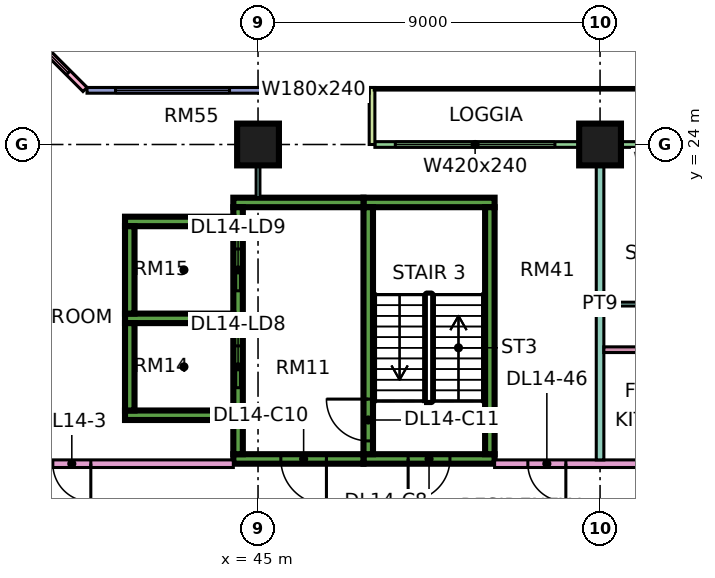
"""IFC4 building model, lengths in metres.
Left out: names, types, materials, properties, quantities, classifications, styles, units other than length and angle.
Written with IfcOpenShell. Run it as: python <this file> out.ifc"""

import sys

from ifc_helpers import new_model, si_unit, direction, frame, frame_2d, origin, origin_2d, place, context, subcontext, project, spatial, rectangle, extrude, element, fill, save


model = new_model("IFC4")
c1 = context("Model", 3, precision=1e-05, world=origin(), true_north=direction((0.0, 1.0)))
c2 = subcontext(c1, "Body", "Model", "MODEL_VIEW")
j1 = project(units=[si_unit("LENGTHUNIT", "METRE"), si_unit("PLANEANGLEUNIT", "RADIAN")], contexts=[c1])
p1 = place(None, origin())
s1 = spatial("IfcSite", under=j1, at=p1, CompositionType="ELEMENT")
p2 = place(p1, origin())
s2 = spatial("IfcBuilding", under=s1, at=p2, CompositionType="ELEMENT")
p3 = place(p2, frame((0.0, 0.0, 67.65)))
s3 = spatial("IfcBuildingStorey", under=s2, at=p3, CompositionType="ELEMENT", Elevation=67.65)
for number, where, z_axis, x_axis in (
    (1, (45.0, 24.0, 0.0), (0.0, 0.0, 1.0), (1.0, 0.0, 0.0)),
    (2, (54.0, 24.0, 0.0), (0.0, 0.0, 1.0), (1.0, 0.0, 0.0)),
):
    element("IfcColumn", number, at=place(p3, frame(where, z_axis=z_axis, x_axis=x_axis)), inside=s3, PredefinedType="COLUMN", context=c2, shape_type="SweptSolid", body=[
        extrude(rectangle(XDim=1.1, YDim=1.1, at=origin_2d()), origin(), (0.0, 0.0, 1.0), 3.75),
    ])
p4 = place(p3, frame((47.775, 15.725, 0.0), z_axis=(0.0, 0.0, 1.0), x_axis=(1.0, 0.0, 0.0)))
e3 = element("IfcWall", 3, at=p4, inside=s3, PredefinedType="SHEAR", context=c2, shape_type="SweptSolid", body=[
    extrude(rectangle(XDim=3.45, YDim=0.25, at=frame_2d((1.725, 0.0))), origin(), (0.0, 0.0, 1.0), 3.75),
])
p5 = place(p4, frame((1.175, 0.0, 0.0)))
e4 = element("IfcOpeningElement", 4, at=p5, cuts=e3, PredefinedType="OPENING", context=c2, shape_type="SweptSolid", body=[
    extrude(rectangle(XDim=1.1, YDim=2.2, at=frame_2d((0.55, 1.1))), frame((0.0, 0.135, 0.0), z_axis=(0.0, -1.0, 0.0), x_axis=(1.0, 0.0, 0.0)), (0.0, 0.0, 1.0), 0.27),
])
p6 = place(p3, frame((47.775, 22.475, 0.0), z_axis=(0.0, 0.0, 1.0), x_axis=(1.0, 0.0, 0.0)))
e5 = element("IfcWall", 5, at=p6, inside=s3, PredefinedType="SHEAR", context=c2, shape_type="SweptSolid", body=[
    extrude(rectangle(XDim=3.45, YDim=0.25, at=frame_2d((1.725, 0.0))), origin(), (0.0, 0.0, 1.0), 3.75),
])
p7 = place(p3, frame((47.9, 15.85, 0.0), z_axis=(0.0, 0.0, 1.0), x_axis=(0.0, 1.0, 0.0)))
e6 = element("IfcWall", 6, at=p7, inside=s3, PredefinedType="SHEAR", context=c2, shape_type="SweptSolid", body=[
    extrude(rectangle(XDim=6.5, YDim=0.25, at=frame_2d((3.25, 0.0))), origin(), (0.0, 0.0, 1.0), 3.75),
])
p8 = place(p7, frame((0.35, 0.0, 0.0)))
e7 = element("IfcOpeningElement", 7, at=p8, cuts=e6, PredefinedType="OPENING", context=c2, shape_type="SweptSolid", body=[
    extrude(rectangle(XDim=1.1, YDim=2.2, at=frame_2d((0.55, 1.1))), frame((0.0, 0.135, 0.0), z_axis=(0.0, -1.0, 0.0), x_axis=(1.0, 0.0, 0.0)), (0.0, 0.0, 1.0), 0.27),
])
p9 = place(p3, frame((51.1, 15.85, 0.0), z_axis=(0.0, 0.0, 1.0), x_axis=(0.0, 1.0, 0.0)))
e8 = element("IfcWall", 8, at=p9, inside=s3, PredefinedType="SHEAR", context=c2, shape_type="SweptSolid", body=[
    extrude(rectangle(XDim=6.5, YDim=0.25, at=frame_2d((3.25, 0.0))), origin(), (0.0, 0.0, 1.0), 3.75),
])
p10 = place(p3, frame((44.35, 15.725, 0.0), z_axis=(0.0, 0.0, 1.0), x_axis=(1.0, 0.0, 0.0)))
e9 = element("IfcWall", 9, at=p10, inside=s3, PredefinedType="SHEAR", context=c2, shape_type="SweptSolid", body=[
    extrude(rectangle(XDim=3.425, YDim=0.25, at=frame_2d((1.712, 0.0))), origin(), (0.0, 0.0, 1.0), 3.75),
])
p11 = place(p10, frame((1.25, 0.0, 0.0)))
e10 = element("IfcOpeningElement", 10, at=p11, cuts=e9, PredefinedType="OPENING", context=c2, shape_type="SweptSolid", body=[
    extrude(rectangle(XDim=1.2, YDim=2.2, at=frame_2d((0.6, 1.1))), frame((0.0, 0.135, 0.0), z_axis=(0.0, -1.0, 0.0), x_axis=(1.0, 0.0, 0.0)), (0.0, 0.0, 1.0), 0.27),
])
p12 = place(p3, frame((44.35, 22.475, 0.0), z_axis=(0.0, 0.0, 1.0), x_axis=(1.0, 0.0, 0.0)))
e11 = element("IfcWall", 11, at=p12, inside=s3, PredefinedType="SHEAR", context=c2, shape_type="SweptSolid", body=[
    extrude(rectangle(XDim=3.425, YDim=0.25, at=frame_2d((1.712, 0.0))), origin(), (0.0, 0.0, 1.0), 3.75),
])
p13 = place(p3, frame((44.475, 15.85, 0.0), z_axis=(0.0, 0.0, 1.0), x_axis=(0.0, 1.0, 0.0)))
e12 = element("IfcWall", 12, at=p13, inside=s3, PredefinedType="SHEAR", context=c2, shape_type="SweptSolid", body=[
    extrude(rectangle(XDim=6.5, YDim=0.25, at=frame_2d((3.25, 0.0))), origin(), (0.0, 0.0, 1.0), 3.75),
])
p14 = place(p13, frame((1.75, 0.0, 0.0)))
e13 = element("IfcOpeningElement", 13, at=p14, cuts=e12, PredefinedType="OPENING", context=c2, shape_type="SweptSolid", body=[
    extrude(rectangle(XDim=1.1, YDim=2.2, at=frame_2d((0.55, 1.1))), frame((0.0, 0.135, 0.0), z_axis=(0.0, -1.0, 0.0), x_axis=(1.0, 0.0, 0.0)), (0.0, 0.0, 1.0), 0.27),
])
p15 = place(p13, frame((4.3, 0.0, 0.0)))
e14 = element("IfcOpeningElement", 14, at=p15, cuts=e12, PredefinedType="OPENING", context=c2, shape_type="SweptSolid", body=[
    extrude(rectangle(XDim=1.1, YDim=2.2, at=frame_2d((0.55, 1.1))), frame((0.0, 0.135, 0.0), z_axis=(0.0, -1.0, 0.0), x_axis=(1.0, 0.0, 0.0)), (0.0, 0.0, 1.0), 0.27),
])
for number, where, z_axis, x_axis in (
    (15, (41.5, 16.875, 0.0), (0.0, 0.0, 1.0), (1.0, 0.0, 0.0)),
    (16, (41.5, 19.425, 0.0), (0.0, 0.0, 1.0), (1.0, 0.0, 0.0)),
    (17, (41.5, 21.975, 0.0), (0.0, 0.0, 1.0), (1.0, 0.0, 0.0)),
):
    element("IfcWall", number, at=place(p3, frame(where, z_axis=z_axis, x_axis=x_axis)), inside=s3, PredefinedType="SHEAR", context=c2, shape_type="SweptSolid", body=[
        extrude(rectangle(XDim=2.85, YDim=0.25, at=frame_2d((1.425, 0.0))), origin(), (0.0, 0.0, 1.0), 3.75),
    ])
for number, where, z_axis, x_axis in (
    (18, (41.625, 17.0, 0.0), (0.0, 0.0, 1.0), (0.0, 1.0, 0.0)),
    (19, (41.625, 19.55, 0.0), (0.0, 0.0, 1.0), (0.0, 1.0, 0.0)),
):
    element("IfcWall", number, at=place(p3, frame(where, z_axis=z_axis, x_axis=x_axis)), inside=s3, PredefinedType="SHEAR", context=c2, shape_type="SweptSolid", body=[
        extrude(rectangle(XDim=2.3, YDim=0.25, at=frame_2d((1.15, 0.0))), origin(), (0.0, 0.0, 1.0), 3.75),
    ])
p16 = place(p3, frame((59.925, 24.0, 0.0), z_axis=(0.0, 0.0, 1.0), x_axis=(-1.0, 0.0, 0.0)))
e20 = element("IfcWall", 20, at=p16, inside=s3, PredefinedType="SOLIDWALL", context=c2, shape_type="SweptSolid", body=[
    extrude(rectangle(XDim=11.85, YDim=0.15, at=frame_2d((5.925, 0.0))), origin(), (0.0, 0.0, 1.0), 3.35),
])
p17 = place(p16, frame((0.562, 0.0, 0.45)))
e21 = element("IfcOpeningElement", 21, at=p17, cuts=e20, PredefinedType="OPENING", context=c2, shape_type="SweptSolid", body=[
    extrude(rectangle(XDim=1.8, YDim=2.4, at=frame_2d((0.9, 1.2))), frame((0.0, 0.085, 0.0), z_axis=(0.0, -1.0, 0.0), x_axis=(1.0, 0.0, 0.0)), (0.0, 0.0, 1.0), 0.17),
])
p18 = place(p16, frame((3.5, 0.0, 0.45)))
e22 = element("IfcOpeningElement", 22, at=p18, cuts=e20, PredefinedType="OPENING", context=c2, shape_type="SweptSolid", body=[
    extrude(rectangle(XDim=1.2, YDim=2.4, at=frame_2d((0.6, 1.2))), frame((0.0, 0.085, 0.0), z_axis=(0.0, -1.0, 0.0), x_axis=(1.0, 0.0, 0.0)), (0.0, 0.0, 1.0), 0.17),
])
p19 = place(p16, frame((7.113, 0.0, 0.45)))
e23 = element("IfcOpeningElement", 23, at=p19, cuts=e20, PredefinedType="OPENING", context=c2, shape_type="SweptSolid", body=[
    extrude(rectangle(XDim=4.2, YDim=2.4, at=frame_2d((2.1, 1.2))), frame((0.0, 0.085, 0.0), z_axis=(0.0, -1.0, 0.0), x_axis=(1.0, 0.0, 0.0)), (0.0, 0.0, 1.0), 0.17),
])
p20 = place(p3, frame((48.0, 25.5, 0.0), z_axis=(0.0, 0.0, 1.0), x_axis=(0.0, -1.0, 0.0)))
e24 = element("IfcWall", 24, at=p20, inside=s3, PredefinedType="SOLIDWALL", context=c2, shape_type="SweptSolid", body=[
    extrude(rectangle(XDim=1.5, YDim=0.15, at=frame_2d((0.75, 0.0))), origin(), (0.0, 0.0, 1.0), 3.35),
])
p21 = place(p3, frame((47.925, 25.425, 0.0), z_axis=(0.0, 0.0, 1.0), x_axis=(-1.0, 0.0, 0.0)))
e25 = element("IfcWall", 25, at=p21, inside=s3, PredefinedType="SOLIDWALL", context=c2, shape_type="SweptSolid", body=[
    extrude(rectangle(XDim=7.425, YDim=0.15, at=frame_2d((3.712, 0.0))), origin(), (0.0, 0.0, 1.0), 3.35),
])
p22 = place(p21, frame((0.562, 0.0, 0.45)))
e26 = element("IfcOpeningElement", 26, at=p22, cuts=e25, PredefinedType="OPENING", context=c2, shape_type="SweptSolid", body=[
    extrude(rectangle(XDim=1.8, YDim=2.4, at=frame_2d((0.9, 1.2))), frame((0.0, 0.085, 0.0), z_axis=(0.0, -1.0, 0.0), x_axis=(1.0, 0.0, 0.0)), (0.0, 0.0, 1.0), 0.17),
])
p23 = place(p21, frame((3.675, 0.0, 0.45)))
e27 = element("IfcOpeningElement", 27, at=p23, cuts=e25, PredefinedType="OPENING", context=c2, shape_type="SweptSolid", body=[
    extrude(rectangle(XDim=3.0, YDim=2.4, at=frame_2d((1.5, 1.2))), frame((0.0, 0.085, 0.0), z_axis=(0.0, -1.0, 0.0), x_axis=(1.0, 0.0, 0.0)), (0.0, 0.0, 1.0), 0.17),
])
p24 = place(p3, frame((40.447, 25.447, 0.0), z_axis=(0.0, 0.0, 1.0), x_axis=(-0.707106781187, 0.707106781187, 0.0)))
e28 = element("IfcWall", 28, at=p24, inside=s3, PredefinedType="SOLIDWALL", context=c2, shape_type="SweptSolid", body=[
    extrude(rectangle(XDim=4.243, YDim=0.15, at=frame_2d((2.121, 0.0))), origin(), (0.0, 0.0, 1.0), 3.35),
])
p25 = place(p24, frame((0.621, 0.0, 0.45)))
e29 = element("IfcOpeningElement", 29, at=p25, cuts=e28, PredefinedType="OPENING", context=c2, shape_type="SweptSolid", body=[
    extrude(rectangle(XDim=3.0, YDim=2.4, at=frame_2d((1.5, 1.2))), frame((0.0, 0.085, 0.0), z_axis=(0.0, -1.0, 0.0), x_axis=(1.0, 0.0, 0.0)), (0.0, 0.0, 1.0), 0.17),
])
p26 = place(p3, frame((34.0, 15.6, 0.0), z_axis=(0.0, 0.0, 1.0), x_axis=(1.0, 0.0, 0.0)))
e30 = element("IfcWall", 30, at=p26, inside=s3, PredefinedType="PARTITIONING", context=c2, shape_type="SweptSolid", body=[
    extrude(rectangle(XDim=10.35, YDim=0.2, at=frame_2d((5.175, 0.0))), origin(), (0.0, 0.0, 1.0), 3.35),
])
p27 = place(p26, frame((5.6, 0.0, 0.0)))
e31 = element("IfcOpeningElement", 31, at=p27, cuts=e30, PredefinedType="OPENING", context=c2, shape_type="SweptSolid", body=[
    extrude(rectangle(XDim=1.0, YDim=2.1, at=frame_2d((0.5, 1.05))), frame((0.0, 0.11, 0.0), z_axis=(0.0, -1.0, 0.0), x_axis=(1.0, 0.0, 0.0)), (0.0, 0.0, 1.0), 0.22),
])
p28 = place(p26, frame((0.45, 0.0, 0.0)))
e32 = element("IfcOpeningElement", 32, at=p28, cuts=e30, PredefinedType="OPENING", context=c2, shape_type="SweptSolid", body=[
    extrude(rectangle(XDim=1.2, YDim=2.1, at=frame_2d((0.6, 1.05))), frame((0.0, 0.11, 0.0), z_axis=(0.0, -1.0, 0.0), x_axis=(1.0, 0.0, 0.0)), (0.0, 0.0, 1.0), 0.22),
])
p29 = place(p3, frame((45.0, 22.6, 0.0), z_axis=(0.0, 0.0, 1.0), x_axis=(0.0, 1.0, 0.0)))
e33 = element("IfcWall", 33, at=p29, inside=s3, PredefinedType="PARTITIONING", context=c2, shape_type="SweptSolid", body=[
    extrude(rectangle(XDim=1.4, YDim=0.1, at=frame_2d((0.7, 0.0))), origin(), (0.0, 0.0, 1.0), 3.35),
])
p30 = place(p3, frame((51.225, 15.6, 0.0), z_axis=(0.0, 0.0, 1.0), x_axis=(1.0, 0.0, 0.0)))
e34 = element("IfcWall", 34, at=p30, inside=s3, PredefinedType="PARTITIONING", context=c2, shape_type="SweptSolid", body=[
    extrude(rectangle(XDim=22.125, YDim=0.2, at=frame_2d((11.062, 0.0))), origin(), (0.0, 0.0, 1.0), 3.35),
])
p31 = place(p30, frame((18.725, 0.0, 0.0)))
e35 = element("IfcOpeningElement", 35, at=p31, cuts=e34, PredefinedType="OPENING", context=c2, shape_type="SweptSolid", body=[
    extrude(rectangle(XDim=1.0, YDim=2.1, at=frame_2d((0.5, 1.05))), frame((0.0, 0.11, 0.0), z_axis=(0.0, -1.0, 0.0), x_axis=(1.0, 0.0, 0.0)), (0.0, 0.0, 1.0), 0.22),
])
p32 = place(p30, frame((0.875, 0.0, 0.0)))
e36 = element("IfcOpeningElement", 36, at=p32, cuts=e34, PredefinedType="OPENING", context=c2, shape_type="SweptSolid", body=[
    extrude(rectangle(XDim=1.0, YDim=2.1, at=frame_2d((0.5, 1.05))), frame((0.0, 0.11, 0.0), z_axis=(0.0, -1.0, 0.0), x_axis=(1.0, 0.0, 0.0)), (0.0, 0.0, 1.0), 0.22),
])
p33 = place(p3, frame((54.0, 15.7, 0.0), z_axis=(0.0, 0.0, 1.0), x_axis=(0.0, 1.0, 0.0)))
e37 = element("IfcWall", 37, at=p33, inside=s3, PredefinedType="PARTITIONING", context=c2, shape_type="SweptSolid", body=[
    extrude(rectangle(XDim=8.226, YDim=0.2, at=frame_2d((4.113, 0.0))), origin(), (0.0, 0.0, 1.0), 3.35),
])
p34 = place(p3, frame((54.1, 18.6, 0.0), z_axis=(0.0, 0.0, 1.0), x_axis=(1.0, 0.0, 0.0)))
e38 = element("IfcWall", 38, at=p34, inside=s3, PredefinedType="PARTITIONING", context=c2, shape_type="SweptSolid", body=[
    extrude(rectangle(XDim=5.675, YDim=0.15, at=frame_2d((2.837, 0.0))), origin(), (0.0, 0.0, 1.0), 3.35),
])
p35 = place(p34, frame((0.95, 0.0, 0.0)))
e39 = element("IfcOpeningElement", 39, at=p35, cuts=e38, PredefinedType="OPENING", context=c2, shape_type="SweptSolid", body=[
    extrude(rectangle(XDim=0.9, YDim=2.1, at=frame_2d((0.45, 1.05))), frame((0.0, 0.085, 0.0), z_axis=(0.0, -1.0, 0.0), x_axis=(1.0, 0.0, 0.0)), (0.0, 0.0, 1.0), 0.17),
])
p36 = place(p3, frame((54.1, 19.8, 0.0), z_axis=(0.0, 0.0, 1.0), x_axis=(1.0, 0.0, 0.0)))
e40 = element("IfcWall", 40, at=p36, inside=s3, PredefinedType="PARTITIONING", context=c2, shape_type="SweptSolid", body=[
    extrude(rectangle(XDim=2.85, YDim=0.1, at=frame_2d((1.425, 0.0))), origin(), (0.0, 0.0, 1.0), 3.35),
])
p37 = place(p19, origin())
e41 = element("IfcWindow", 41, at=p37, inside=s3, PartitioningType="SINGLE_PANEL", PredefinedType="WINDOW", context=c2, shape_type="SweptSolid", body=[
    extrude(rectangle(XDim=4.2, YDim=2.4, at=frame_2d((2.1, 1.2))), frame((0.0, 0.03, 0.0), z_axis=(0.0, -1.0, 0.0), x_axis=(1.0, 0.0, 0.0)), (0.0, 0.0, 1.0), 0.06),
])
fill(e23, e41)
p38 = place(p22, origin())
e42 = element("IfcWindow", 42, at=p38, inside=s3, PartitioningType="SINGLE_PANEL", PredefinedType="WINDOW", context=c2, shape_type="SweptSolid", body=[
    extrude(rectangle(XDim=1.8, YDim=2.4, at=frame_2d((0.9, 1.2))), frame((0.0, 0.03, 0.0), z_axis=(0.0, -1.0, 0.0), x_axis=(1.0, 0.0, 0.0)), (0.0, 0.0, 1.0), 0.06),
])
fill(e26, e42)
p39 = place(p23, origin())
e43 = element("IfcWindow", 43, at=p39, inside=s3, PartitioningType="SINGLE_PANEL", PredefinedType="WINDOW", context=c2, shape_type="SweptSolid", body=[
    extrude(rectangle(XDim=3.0, YDim=2.4, at=frame_2d((1.5, 1.2))), frame((0.0, 0.03, 0.0), z_axis=(0.0, -1.0, 0.0), x_axis=(1.0, 0.0, 0.0)), (0.0, 0.0, 1.0), 0.06),
])
fill(e27, e43)
p40 = place(p25, origin())
e44 = element("IfcWindow", 44, at=p40, inside=s3, PartitioningType="SINGLE_PANEL", PredefinedType="WINDOW", context=c2, shape_type="SweptSolid", body=[
    extrude(rectangle(XDim=3.0, YDim=2.4, at=frame_2d((1.5, 1.2))), frame((0.0, 0.03, 0.0), z_axis=(0.0, -1.0, 0.0), x_axis=(1.0, 0.0, 0.0)), (0.0, 0.0, 1.0), 0.06),
])
fill(e29, e44)
p41 = place(p5, frame((1.1, 0.0, 0.0), z_axis=(0.0, 0.0, 1.0), x_axis=(-1.0, 0.0, 0.0)))
e45 = element("IfcDoor", 45, at=p41, inside=s3, OperationType="SINGLE_SWING_LEFT", PredefinedType="DOOR", context=c2, shape_type="SweptSolid", body=[
    extrude(rectangle(XDim=1.1, YDim=2.2, at=frame_2d((0.55, 1.1))), frame((0.0, 0.025, 0.0), z_axis=(0.0, -1.0, 0.0), x_axis=(1.0, 0.0, 0.0)), (0.0, 0.0, 1.0), 0.05),
])
fill(e4, e45)
p42 = place(p11, origin())
e46 = element("IfcDoor", 46, at=p42, inside=s3, OperationType="SINGLE_SWING_RIGHT", PredefinedType="DOOR", context=c2, shape_type="SweptSolid", body=[
    extrude(rectangle(XDim=1.2, YDim=2.2, at=frame_2d((0.6, 1.1))), frame((0.0, 0.025, 0.0), z_axis=(0.0, -1.0, 0.0), x_axis=(1.0, 0.0, 0.0)), (0.0, 0.0, 1.0), 0.05),
])
fill(e10, e46)
p43 = place(p8, frame((1.1, 0.0, 0.0), z_axis=(0.0, 0.0, 1.0), x_axis=(-1.0, 0.0, 0.0)))
e47 = element("IfcDoor", 47, at=p43, inside=s3, OperationType="SINGLE_SWING_RIGHT", PredefinedType="DOOR", context=c2, shape_type="SweptSolid", body=[
    extrude(rectangle(XDim=1.1, YDim=2.2, at=frame_2d((0.55, 1.1))), frame((0.0, 0.025, 0.0), z_axis=(0.0, -1.0, 0.0), x_axis=(1.0, 0.0, 0.0)), (0.0, 0.0, 1.0), 0.05),
])
fill(e7, e47)
p44 = place(p14, origin())
e48 = element("IfcDoor", 48, at=p44, inside=s3, OperationType="DOUBLE_DOOR_SLIDING", PredefinedType="DOOR", context=c2, shape_type="SweptSolid", body=[
    extrude(rectangle(XDim=1.1, YDim=2.2, at=frame_2d((0.55, 1.1))), frame((0.0, 0.025, 0.0), z_axis=(0.0, -1.0, 0.0), x_axis=(1.0, 0.0, 0.0)), (0.0, 0.0, 1.0), 0.05),
])
fill(e13, e48)
p45 = place(p15, origin())
e49 = element("IfcDoor", 49, at=p45, inside=s3, OperationType="DOUBLE_DOOR_SLIDING", PredefinedType="DOOR", context=c2, shape_type="SweptSolid", body=[
    extrude(rectangle(XDim=1.1, YDim=2.2, at=frame_2d((0.55, 1.1))), frame((0.0, 0.025, 0.0), z_axis=(0.0, -1.0, 0.0), x_axis=(1.0, 0.0, 0.0)), (0.0, 0.0, 1.0), 0.05),
])
fill(e14, e49)
p46 = place(p27, origin())
e50 = element("IfcDoor", 50, at=p46, inside=s3, OperationType="SINGLE_SWING_RIGHT", PredefinedType="DOOR", context=c2, shape_type="SweptSolid", body=[
    extrude(rectangle(XDim=1.0, YDim=2.1, at=frame_2d((0.5, 1.05))), frame((0.0, 0.025, 0.0), z_axis=(0.0, -1.0, 0.0), x_axis=(1.0, 0.0, 0.0)), (0.0, 0.0, 1.0), 0.05),
])
fill(e31, e50)
p47 = place(p32, origin())
e51 = element("IfcDoor", 51, at=p47, inside=s3, OperationType="SINGLE_SWING_RIGHT", PredefinedType="DOOR", context=c2, shape_type="SweptSolid", body=[
    extrude(rectangle(XDim=1.0, YDim=2.1, at=frame_2d((0.5, 1.05))), frame((0.0, 0.025, 0.0), z_axis=(0.0, -1.0, 0.0), x_axis=(1.0, 0.0, 0.0)), (0.0, 0.0, 1.0), 0.05),
])
fill(e36, e51)
save(model, sys.argv[1])
